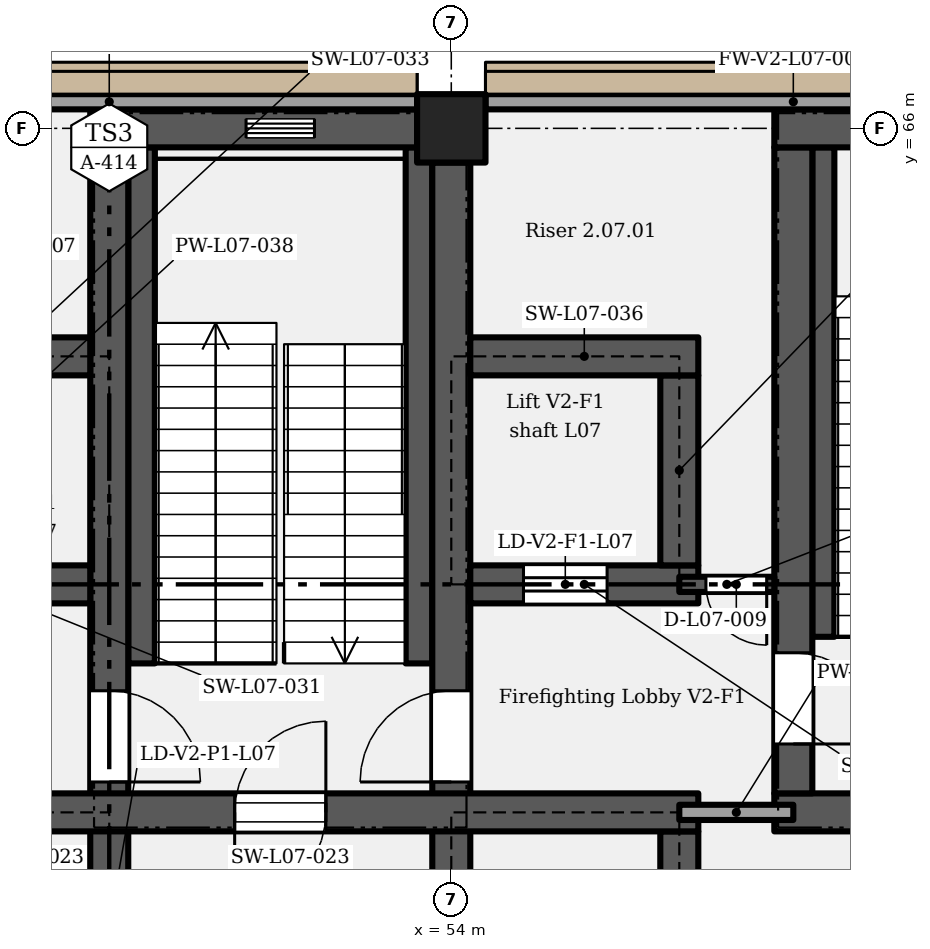
"""IFC4 building model, lengths in metres.
Left out: names, types, materials, properties, quantities, classifications, styles, units other than length and angle.
Written with IfcOpenShell. Run it as: python <this file> out.ifc"""

import sys

from ifc_helpers import new_model, si_unit, direction, frame, frame_2d, origin, origin_2d, place, context, subcontext, project, spatial, rectangle, extrude, element, fill, save


model = new_model("IFC4")
c1 = context("Model", 3, precision=1e-05, world=origin(), true_north=direction((0.0, 1.0)))
c2 = subcontext(c1, "Body", "Model", "MODEL_VIEW")
j1 = project(units=[si_unit("LENGTHUNIT", "METRE"), si_unit("PLANEANGLEUNIT", "RADIAN")], contexts=[c1])
p1 = place(None, origin())
s1 = spatial("IfcSite", under=j1, at=p1, CompositionType="ELEMENT")
p2 = place(p1, origin())
s2 = spatial("IfcBuilding", under=s1, at=p2, CompositionType="ELEMENT")
p3 = place(p2, frame((0.0, 0.0, 39.0)))
s3 = spatial("IfcBuildingStorey", under=s2, at=p3, CompositionType="ELEMENT", Elevation=39.0)
p4 = place(p3, frame((54.0, 66.0, 0.0), z_axis=(0.0, 0.0, 1.0), x_axis=(1.0, 0.0, 0.0)))
e1 = element("IfcColumn", 1, at=p4, inside=s3, PredefinedType="COLUMN", context=c2, shape_type="SweptSolid", body=[
    extrude(rectangle(XDim=0.9, YDim=0.9, at=origin_2d()), origin(), (0.0, 0.0, 1.0), 5.4),
])
p5 = place(p3, frame((49.5, 54.25, 0.0), z_axis=(0.0, 0.0, 1.0), x_axis=(0.0, 1.0, 0.0)))
e2 = element("IfcWall", 2, at=p5, inside=s3, PredefinedType="SHEAR", context=c2, shape_type="SweptSolid", body=[
    extrude(rectangle(XDim=11.5, YDim=0.5, at=frame_2d((5.75, 0.0))), origin(), (0.0, 0.0, 1.0), 5.15),
])
p6 = place(p5, frame((0.7, 0.0, 0.0)))
e3 = element("IfcOpeningElement", 3, at=p6, cuts=e2, PredefinedType="OPENING", context=c2, shape_type="SweptSolid", body=[
    extrude(rectangle(XDim=1.1, YDim=2.1, at=frame_2d((0.55, 1.05))), frame((0.0, 0.26, 0.0), z_axis=(0.0, -1.0, 0.0), x_axis=(1.0, 0.0, 0.0)), (0.0, 0.0, 1.0), 0.52),
])
p7 = place(p5, frame((4.35, 0.0, 0.0), z_axis=(0.0, 0.0, 1.0), x_axis=(-1.0, 0.0, 0.0)))
e4 = element("IfcOpeningElement", 4, at=p7, cuts=e2, PredefinedType="OPENING", context=c2, shape_type="SweptSolid", body=[
    extrude(rectangle(XDim=1.2, YDim=2.1, at=frame_2d((0.6, 1.05))), frame((0.0, 0.26, 0.0), z_axis=(0.0, -1.0, 0.0), x_axis=(1.0, 0.0, 0.0)), (0.0, 0.0, 1.0), 0.52),
])
p8 = place(p3, frame((57.0, 54.25, 0.0), z_axis=(0.0, 0.0, 1.0), x_axis=(0.0, 1.0, 0.0)))
e5 = element("IfcWall", 5, at=p8, inside=s3, PredefinedType="SHEAR", context=c2, shape_type="SweptSolid", body=[
    extrude(rectangle(XDim=2.5, YDim=0.5, at=frame_2d((1.25, 0.0))), origin(), (0.0, 0.0, 1.0), 5.15),
])
p9 = place(p3, frame((54.0, 54.45, 0.0), z_axis=(0.0, 0.0, 1.0), x_axis=(0.0, 1.0, 0.0)))
e6 = element("IfcWall", 6, at=p9, inside=s3, PredefinedType="SHEAR", context=c2, shape_type="SweptSolid", body=[
    extrude(rectangle(XDim=11.1, YDim=0.5, at=frame_2d((5.55, 0.0))), origin(), (0.0, 0.0, 1.0), 5.15),
])
p10 = place(p9, frame((0.5, 0.0, 0.0)))
e7 = element("IfcOpeningElement", 7, at=p10, cuts=e6, PredefinedType="OPENING", context=c2, shape_type="SweptSolid", body=[
    extrude(rectangle(XDim=1.1, YDim=2.1, at=frame_2d((0.55, 1.05))), frame((0.0, 0.26, 0.0), z_axis=(0.0, -1.0, 0.0), x_axis=(1.0, 0.0, 0.0)), (0.0, 0.0, 1.0), 0.52),
])
p11 = place(p9, frame((2.95, 0.0, 0.0)))
e8 = element("IfcOpeningElement", 8, at=p11, cuts=e6, PredefinedType="OPENING", context=c2, shape_type="SweptSolid", body=[
    extrude(rectangle(XDim=1.2, YDim=2.1, at=frame_2d((0.6, 1.05))), frame((0.0, 0.26, 0.0), z_axis=(0.0, -1.0, 0.0), x_axis=(1.0, 0.0, 0.0)), (0.0, 0.0, 1.0), 0.52),
])
p12 = place(p3, frame((46.25, 57.0, 0.0), z_axis=(0.0, 0.0, 1.0), x_axis=(1.0, 0.0, 0.0)))
e9 = element("IfcWall", 9, at=p12, inside=s3, PredefinedType="SHEAR", context=c2, shape_type="SweptSolid", body=[
    extrude(rectangle(XDim=11.0, YDim=0.5, at=frame_2d((5.5, 0.0))), origin(), (0.0, 0.0, 1.0), 5.15),
])
p13 = place(p12, frame((4.9, 0.0, 0.0)))
e10 = element("IfcOpeningElement", 10, at=p13, cuts=e9, PredefinedType="OPENING", context=c2, shape_type="SweptSolid", body=[
    extrude(rectangle(XDim=1.2, YDim=2.1, at=frame_2d((0.6, 1.05))), frame((0.0, 0.26, 0.0), z_axis=(0.0, -1.0, 0.0), x_axis=(1.0, 0.0, 0.0)), (0.0, 0.0, 1.0), 0.52),
])
p14 = place(p3, frame((58.25, 57.0, 0.0), z_axis=(0.0, 0.0, 1.0), x_axis=(1.0, 0.0, 0.0)))
e11 = element("IfcWall", 11, at=p14, inside=s3, PredefinedType="SHEAR", context=c2, shape_type="SweptSolid", body=[
    extrude(rectangle(XDim=5.0, YDim=0.5, at=frame_2d((2.5, 0.0))), origin(), (0.0, 0.0, 1.0), 5.15),
])
p15 = place(p14, frame((2.0, 0.0, 0.0)))
e12 = element("IfcOpeningElement", 12, at=p15, cuts=e11, PredefinedType="OPENING", context=c2, shape_type="SweptSolid", body=[
    extrude(rectangle(XDim=1.0, YDim=2.1, at=frame_2d((0.5, 1.05))), frame((0.0, 0.26, 0.0), z_axis=(0.0, -1.0, 0.0), x_axis=(1.0, 0.0, 0.0)), (0.0, 0.0, 1.0), 0.52),
])
p16 = place(p3, frame((58.5, 57.25, 0.0), z_axis=(0.0, 0.0, 1.0), x_axis=(0.0, 1.0, 0.0)))
e13 = element("IfcWall", 13, at=p16, inside=s3, PredefinedType="SHEAR", context=c2, shape_type="SweptSolid", body=[
    extrude(rectangle(XDim=8.5, YDim=0.5, at=frame_2d((4.25, 0.0))), origin(), (0.0, 0.0, 1.0), 5.15),
])
p17 = place(p16, frame((1.85, 0.0, 0.0), z_axis=(0.0, 0.0, 1.0), x_axis=(-1.0, 0.0, 0.0)))
e14 = element("IfcOpeningElement", 14, at=p17, cuts=e13, PredefinedType="OPENING", context=c2, shape_type="SweptSolid", body=[
    extrude(rectangle(XDim=1.2, YDim=2.1, at=frame_2d((0.6, 1.05))), frame((0.0, 0.26, 0.0), z_axis=(0.0, -1.0, 0.0), x_axis=(1.0, 0.0, 0.0)), (0.0, 0.0, 1.0), 0.52),
])
p18 = place(p3, frame((46.25, 60.0, 0.0), z_axis=(0.0, 0.0, 1.0), x_axis=(1.0, 0.0, 0.0)))
e15 = element("IfcWall", 15, at=p18, inside=s3, PredefinedType="SHEAR", context=c2, shape_type="SweptSolid", body=[
    extrude(rectangle(XDim=3.0, YDim=0.5, at=frame_2d((1.5, 0.0))), origin(), (0.0, 0.0, 1.0), 5.15),
])
p19 = place(p3, frame((54.25, 60.0, 0.0), z_axis=(0.0, 0.0, 1.0), x_axis=(1.0, 0.0, 0.0)))
e16 = element("IfcWall", 16, at=p19, inside=s3, PredefinedType="SHEAR", context=c2, shape_type="SweptSolid", body=[
    extrude(rectangle(XDim=3.0, YDim=0.5, at=frame_2d((1.5, 0.0))), origin(), (0.0, 0.0, 1.0), 5.15),
])
p20 = place(p19, frame((0.7, 0.0, 0.0)))
e17 = element("IfcOpeningElement", 17, at=p20, cuts=e16, PredefinedType="OPENING", context=c2, shape_type="SweptSolid", body=[
    extrude(rectangle(XDim=1.1, YDim=2.1, at=frame_2d((0.55, 1.05))), frame((0.0, 0.26, 0.0), z_axis=(0.0, -1.0, 0.0), x_axis=(1.0, 0.0, 0.0)), (0.0, 0.0, 1.0), 0.52),
])
p21 = place(p3, frame((57.0, 60.25, 0.0), z_axis=(0.0, 0.0, 1.0), x_axis=(0.0, 1.0, 0.0)))
e18 = element("IfcWall", 18, at=p21, inside=s3, PredefinedType="SHEAR", context=c2, shape_type="SweptSolid", body=[
    extrude(rectangle(XDim=2.5, YDim=0.5, at=frame_2d((1.25, 0.0))), origin(), (0.0, 0.0, 1.0), 5.15),
])
for number, where, z_axis, x_axis in (
    (19, (46.25, 63.0, 0.0), (0.0, 0.0, 1.0), (1.0, 0.0, 0.0)),
    (20, (54.25, 63.0, 0.0), (0.0, 0.0, 1.0), (1.0, 0.0, 0.0)),
):
    element("IfcWall", number, at=place(p3, frame(where, z_axis=z_axis, x_axis=x_axis)), inside=s3, PredefinedType="SHEAR", context=c2, shape_type="SweptSolid", body=[
        extrude(rectangle(XDim=3.0, YDim=0.5, at=frame_2d((1.5, 0.0))), origin(), (0.0, 0.0, 1.0), 5.15),
    ])
for number, where, z_axis, x_axis in (
    (21, (49.25, 66.0, 0.0), (0.0, 0.0, 1.0), (1.0, 0.0, 0.0)),
    (22, (58.25, 66.0, 0.0), (0.0, 0.0, 1.0), (1.0, 0.0, 0.0)),
):
    element("IfcWall", number, at=place(p3, frame(where, z_axis=z_axis, x_axis=x_axis)), inside=s3, PredefinedType="SHEAR", context=c2, shape_type="SweptSolid", body=[
        extrude(rectangle(XDim=4.3, YDim=0.5, at=frame_2d((2.15, 0.0))), origin(), (0.0, 0.0, 1.0), 5.15),
    ])
p22 = place(p3, frame((45.45, 66.35, 0.0), z_axis=(0.0, 0.0, 1.0), x_axis=(1.0, 0.0, 0.0)))
e23 = element("IfcWall", 23, at=p22, inside=s3, PredefinedType="SOLIDWALL", context=c2, shape_type="SweptSolid", body=[
    extrude(rectangle(XDim=8.1, YDim=0.2, at=frame_2d((4.05, 0.0))), origin(), (0.0, 0.0, 1.0), 5.15),
])
p23 = place(p22, frame((0.375, 0.0, 1.2)))
e24 = element("IfcOpeningElement", 24, at=p23, cuts=e23, PredefinedType="OPENING", context=c2, shape_type="SweptSolid", body=[
    extrude(rectangle(XDim=1.35, YDim=3.0, at=frame_2d((0.675, 1.5))), frame((0.0, 0.11, 0.0), z_axis=(0.0, -1.0, 0.0), x_axis=(1.0, 0.0, 0.0)), (0.0, 0.0, 1.0), 0.22),
])
p24 = place(p3, frame((54.45, 66.35, 0.0), z_axis=(0.0, 0.0, 1.0), x_axis=(1.0, 0.0, 0.0)))
e25 = element("IfcWall", 25, at=p24, inside=s3, PredefinedType="SOLIDWALL", context=c2, shape_type="SweptSolid", body=[
    extrude(rectangle(XDim=8.1, YDim=0.2, at=frame_2d((4.05, 0.0))), origin(), (0.0, 0.0, 1.0), 5.15),
])
p25 = place(p3, frame((49.375, 57.0, 5.4), z_axis=(0.0, 0.0, 1.0), x_axis=(1.0, 0.0, 0.0)))
e26 = element("IfcWall", 26, at=p25, inside=s3, PredefinedType="SOLIDWALL", context=c2, shape_type="SweptSolid", body=[
    extrude(rectangle(XDim=4.75, YDim=0.25, at=frame_2d((2.375, 0.0))), origin(), (0.0, 0.0, 1.0), 3.1),
])
p26 = place(p25, frame((2.975, 0.0, 0.0), z_axis=(0.0, 0.0, 1.0), x_axis=(-1.0, 0.0, 0.0)))
e27 = element("IfcOpeningElement", 27, at=p26, cuts=e26, PredefinedType="OPENING", context=c2, shape_type="SweptSolid", body=[
    extrude(rectangle(XDim=1.2, YDim=2.1, at=frame_2d((0.6, 1.05))), frame((0.0, 0.135, 0.0), z_axis=(0.0, -1.0, 0.0), x_axis=(1.0, 0.0, 0.0)), (0.0, 0.0, 1.0), 0.27),
])
p27 = place(p3, frame((49.375, 66.0, 5.4), z_axis=(0.0, 0.0, 1.0), x_axis=(1.0, 0.0, 0.0)))
e28 = element("IfcWall", 28, at=p27, inside=s3, PredefinedType="SOLIDWALL", context=c2, shape_type="SweptSolid", body=[
    extrude(rectangle(XDim=4.75, YDim=0.25, at=frame_2d((2.375, 0.0))), origin(), (0.0, 0.0, 1.0), 3.1),
])
p28 = place(p27, frame((1.925, 0.0, 2.4)))
e29 = element("IfcOpeningElement", 29, at=p28, cuts=e28, PredefinedType="OPENING", context=c2, shape_type="SweptSolid", body=[
    extrude(rectangle(XDim=0.9, YDim=0.6, at=frame_2d((0.45, 0.3))), frame((0.0, 0.135, 0.0), z_axis=(0.0, -1.0, 0.0), x_axis=(1.0, 0.0, 0.0)), (0.0, 0.0, 1.0), 0.27),
])
for number, where, z_axis, x_axis in (
    (30, (49.5, 57.125, 5.4), (0.0, 0.0, 1.0), (0.0, 1.0, 0.0)),
    (31, (54.0, 57.125, 5.4), (0.0, 0.0, 1.0), (0.0, 1.0, 0.0)),
):
    element("IfcWall", number, at=place(p3, frame(where, z_axis=z_axis, x_axis=x_axis)), inside=s3, PredefinedType="SOLIDWALL", context=c2, shape_type="SweptSolid", body=[
        extrude(rectangle(XDim=8.75, YDim=0.25, at=frame_2d((4.375, 0.0))), origin(), (0.0, 0.0, 1.0), 3.1),
    ])
p29 = place(p3, frame((58.375, 57.0, 5.4), z_axis=(0.0, 0.0, 1.0), x_axis=(1.0, 0.0, 0.0)))
e32 = element("IfcWall", 32, at=p29, inside=s3, PredefinedType="SOLIDWALL", context=c2, shape_type="SweptSolid", body=[
    extrude(rectangle(XDim=4.75, YDim=0.25, at=frame_2d((2.375, 0.0))), origin(), (0.0, 0.0, 1.0), 3.1),
])
p30 = place(p29, frame((2.975, 0.0, 0.0), z_axis=(0.0, 0.0, 1.0), x_axis=(-1.0, 0.0, 0.0)))
e33 = element("IfcOpeningElement", 33, at=p30, cuts=e32, PredefinedType="OPENING", context=c2, shape_type="SweptSolid", body=[
    extrude(rectangle(XDim=1.2, YDim=2.1, at=frame_2d((0.6, 1.05))), frame((0.0, 0.135, 0.0), z_axis=(0.0, -1.0, 0.0), x_axis=(1.0, 0.0, 0.0)), (0.0, 0.0, 1.0), 0.27),
])
p31 = place(p3, frame((58.375, 66.0, 5.4), z_axis=(0.0, 0.0, 1.0), x_axis=(1.0, 0.0, 0.0)))
e34 = element("IfcWall", 34, at=p31, inside=s3, PredefinedType="SOLIDWALL", context=c2, shape_type="SweptSolid", body=[
    extrude(rectangle(XDim=4.75, YDim=0.25, at=frame_2d((2.375, 0.0))), origin(), (0.0, 0.0, 1.0), 3.1),
])
p32 = place(p31, frame((1.925, 0.0, 2.4)))
e35 = element("IfcOpeningElement", 35, at=p32, cuts=e34, PredefinedType="OPENING", context=c2, shape_type="SweptSolid", body=[
    extrude(rectangle(XDim=0.9, YDim=0.6, at=frame_2d((0.45, 0.3))), frame((0.0, 0.135, 0.0), z_axis=(0.0, -1.0, 0.0), x_axis=(1.0, 0.0, 0.0)), (0.0, 0.0, 1.0), 0.27),
])
p33 = place(p3, frame((58.5, 57.125, 5.4), z_axis=(0.0, 0.0, 1.0), x_axis=(0.0, 1.0, 0.0)))
e36 = element("IfcWall", 36, at=p33, inside=s3, PredefinedType="SOLIDWALL", context=c2, shape_type="SweptSolid", body=[
    extrude(rectangle(XDim=8.75, YDim=0.25, at=frame_2d((4.375, 0.0))), origin(), (0.0, 0.0, 1.0), 3.1),
])
p34 = place(p3, frame((57.0, 57.0, 0.0), z_axis=(0.0, 0.0, 1.0), x_axis=(1.0, 0.0, 0.0)))
e37 = element("IfcWall", 37, at=p34, inside=s3, PredefinedType="PARTITIONING", context=c2, shape_type="SweptSolid", body=[
    extrude(rectangle(XDim=1.5, YDim=0.2, at=frame_2d((0.75, 0.0))), origin(), (0.0, 0.0, 1.0), 5.15),
])
p35 = place(p3, frame((57.0, 60.0, 0.0), z_axis=(0.0, 0.0, 1.0), x_axis=(1.0, 0.0, 0.0)))
e38 = element("IfcWall", 38, at=p35, inside=s3, PredefinedType="SHEAR", context=c2, shape_type="SweptSolid", body=[
    extrude(rectangle(XDim=1.25, YDim=0.2, at=frame_2d((0.625, 0.0))), origin(), (0.0, 0.0, 1.0), 5.15),
])
p36 = place(p35, frame((1.15, 0.0, 0.0), z_axis=(0.0, 0.0, 1.0), x_axis=(-1.0, 0.0, 0.0)))
e39 = element("IfcOpeningElement", 39, at=p36, cuts=e38, PredefinedType="OPENING", context=c2, shape_type="SweptSolid", body=[
    extrude(rectangle(XDim=0.8, YDim=2.0, at=frame_2d((0.4, 1.0))), frame((0.0, 0.11, 0.0), z_axis=(0.0, -1.0, 0.0), x_axis=(1.0, 0.0, 0.0)), (0.0, 0.0, 1.0), 0.22),
])
p37 = place(p3, frame((49.925, 58.96, 0.0), z_axis=(0.0, 0.0, 1.0), x_axis=(0.0, 1.0, 0.0)))
e40 = element("IfcWall", 40, at=p37, inside=s3, PredefinedType="SHEAR", context=c2, shape_type="SweptSolid", body=[
    extrude(rectangle(XDim=6.79, YDim=0.35, at=frame_2d((3.395, 0.0))), origin(), (0.0, 0.0, 1.0), 2.587),
])
p38 = place(p3, frame((53.575, 58.96, 0.0), z_axis=(0.0, 0.0, 1.0), x_axis=(0.0, 1.0, 0.0)))
e41 = element("IfcWall", 41, at=p38, inside=s3, PredefinedType="SHEAR", context=c2, shape_type="SweptSolid", body=[
    extrude(rectangle(XDim=6.79, YDim=0.35, at=frame_2d((3.395, 0.0))), origin(), (0.0, 0.0, 1.0), 5.15),
])
p39 = place(p3, frame((58.895, 59.31, 0.0), z_axis=(0.0, 0.0, 1.0), x_axis=(0.0, 1.0, 0.0)))
e42 = element("IfcWall", 42, at=p39, inside=s3, PredefinedType="SHEAR", context=c2, shape_type="SweptSolid", body=[
    extrude(rectangle(XDim=6.44, YDim=0.29, at=frame_2d((3.22, 0.0))), origin(), (0.0, 0.0, 1.0), 2.587),
])
p40 = place(p26, origin())
e43 = element("IfcDoor", 43, at=p40, inside=s3, OperationType="SINGLE_SWING_LEFT", PredefinedType="DOOR", context=c2, shape_type="SweptSolid", body=[
    extrude(rectangle(XDim=1.2, YDim=2.1, at=frame_2d((0.6, 1.05))), frame((0.0, 0.025, 0.0), z_axis=(0.0, -1.0, 0.0), x_axis=(1.0, 0.0, 0.0)), (0.0, 0.0, 1.0), 0.05),
])
fill(e27, e43)
p41 = place(p28, origin())
e44 = element("IfcWindow", 44, at=p41, inside=s3, PartitioningType="SINGLE_PANEL", PredefinedType="WINDOW", context=c2, shape_type="SweptSolid", body=[
    extrude(rectangle(XDim=0.9, YDim=0.6, at=frame_2d((0.45, 0.3))), frame((0.0, 0.03, 0.0), z_axis=(0.0, -1.0, 0.0), x_axis=(1.0, 0.0, 0.0)), (0.0, 0.0, 1.0), 0.06),
])
fill(e29, e44)
p42 = place(p13, origin())
e45 = element("IfcDoor", 45, at=p42, inside=s3, OperationType="SINGLE_SWING_RIGHT", PredefinedType="DOOR", context=c2, shape_type="SweptSolid", body=[
    extrude(rectangle(XDim=1.2, YDim=2.1, at=frame_2d((0.6, 1.05))), frame((0.0, 0.025, 0.0), z_axis=(0.0, -1.0, 0.0), x_axis=(1.0, 0.0, 0.0)), (0.0, 0.0, 1.0), 0.05),
])
fill(e10, e45)
p43 = place(p20, origin())
e46 = element("IfcDoor", 46, at=p43, inside=s3, OperationType="SLIDING_TO_LEFT", PredefinedType="DOOR", context=c2, shape_type="SweptSolid", body=[
    extrude(rectangle(XDim=1.1, YDim=2.1, at=frame_2d((0.55, 1.05))), frame((0.0, 0.025, 0.0), z_axis=(0.0, -1.0, 0.0), x_axis=(1.0, 0.0, 0.0)), (0.0, 0.0, 1.0), 0.05),
])
fill(e17, e46)
p44 = place(p11, origin())
e47 = element("IfcDoor", 47, at=p44, inside=s3, OperationType="SINGLE_SWING_LEFT", PredefinedType="DOOR", context=c2, shape_type="SweptSolid", body=[
    extrude(rectangle(XDim=1.2, YDim=2.1, at=frame_2d((0.6, 1.05))), frame((0.0, 0.025, 0.0), z_axis=(0.0, -1.0, 0.0), x_axis=(1.0, 0.0, 0.0)), (0.0, 0.0, 1.0), 0.05),
])
fill(e8, e47)
p45 = place(p17, origin())
e48 = element("IfcDoor", 48, at=p45, inside=s3, OperationType="SINGLE_SWING_RIGHT", PredefinedType="DOOR", context=c2, shape_type="SweptSolid", body=[
    extrude(rectangle(XDim=1.2, YDim=2.1, at=frame_2d((0.6, 1.05))), frame((0.0, 0.025, 0.0), z_axis=(0.0, -1.0, 0.0), x_axis=(1.0, 0.0, 0.0)), (0.0, 0.0, 1.0), 0.05),
])
fill(e14, e48)
p46 = place(p36, origin())
e49 = element("IfcDoor", 49, at=p46, inside=s3, OperationType="SINGLE_SWING_LEFT", PredefinedType="DOOR", context=c2, shape_type="SweptSolid", body=[
    extrude(rectangle(XDim=0.8, YDim=2.0, at=frame_2d((0.4, 1.0))), frame((0.0, 0.025, 0.0), z_axis=(0.0, -1.0, 0.0), x_axis=(1.0, 0.0, 0.0)), (0.0, 0.0, 1.0), 0.05),
])
fill(e39, e49)
p47 = place(p7, origin())
e50 = element("IfcDoor", 50, at=p47, inside=s3, OperationType="SINGLE_SWING_RIGHT", PredefinedType="DOOR", context=c2, shape_type="SweptSolid", body=[
    extrude(rectangle(XDim=1.2, YDim=2.1, at=frame_2d((0.6, 1.05))), frame((0.0, 0.025, 0.0), z_axis=(0.0, -1.0, 0.0), x_axis=(1.0, 0.0, 0.0)), (0.0, 0.0, 1.0), 0.05),
])
fill(e4, e50)
save(model, sys.argv[1])
